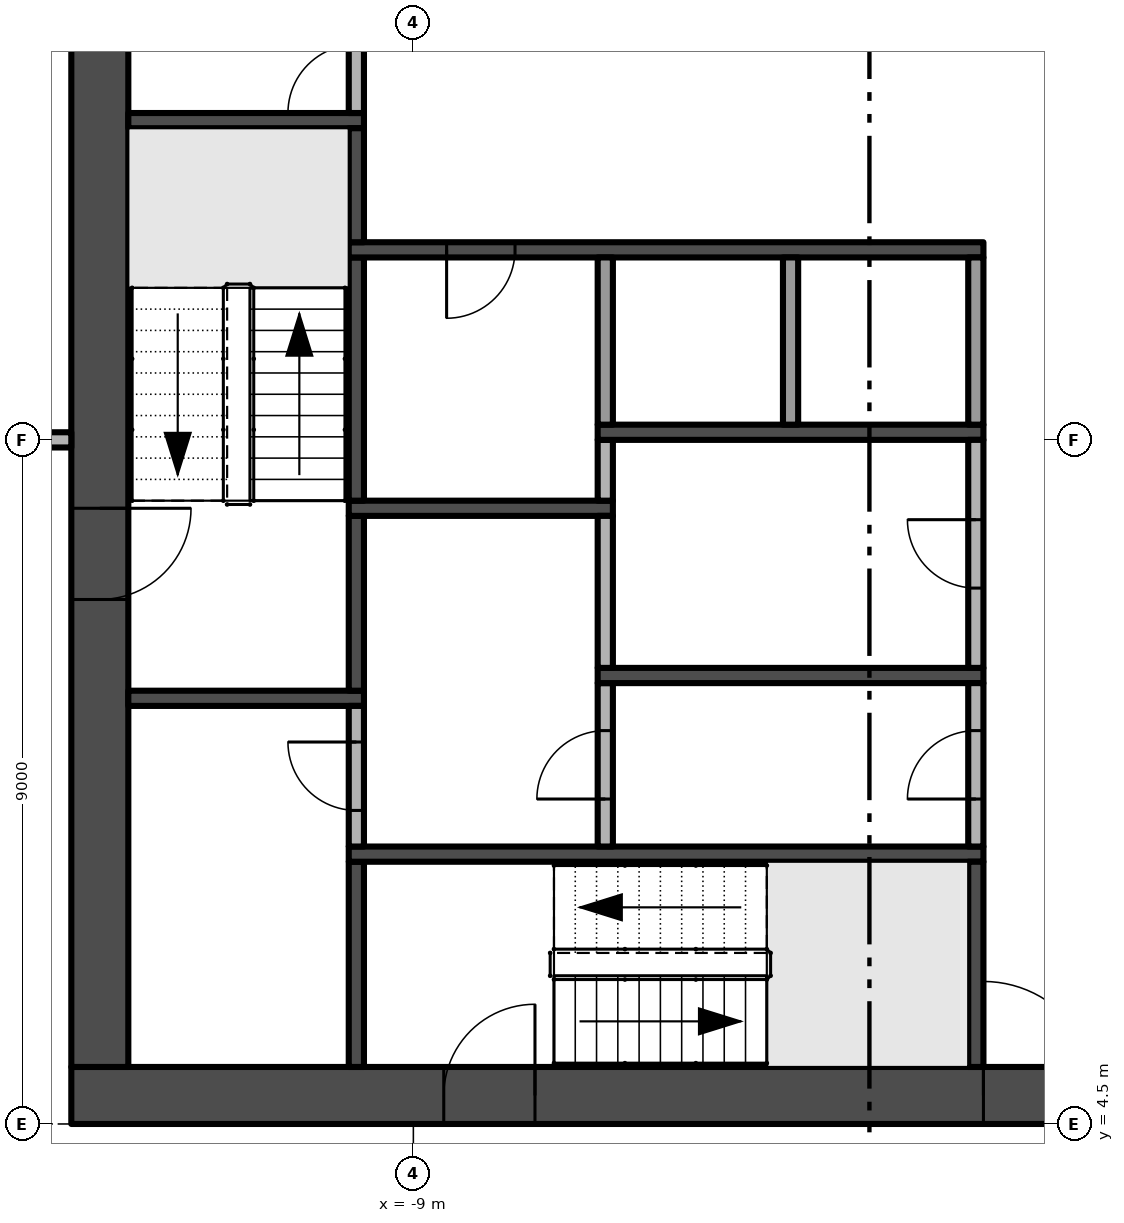
"""IFC4 building model, lengths in metres.
Left out: names, types, materials, properties, quantities, classifications, styles, units other than length and angle.
Written with IfcOpenShell. Run it as: python <this file> out.ifc"""

import sys

from ifc_helpers import new_model, si_unit, direction, frame, frame_2d, origin, place, context, subcontext, project, spatial, rectangle, extrude, element, fill, save


model = new_model("IFC4")
c1 = context("Model", 3, precision=1e-05, world=origin(), true_north=direction((0.0, 1.0)))
c2 = subcontext(c1, "Body", "Model", "MODEL_VIEW")
j1 = project(units=[si_unit("LENGTHUNIT", "METRE"), si_unit("PLANEANGLEUNIT", "RADIAN")], contexts=[c1])
p1 = place(None, origin())
s1 = spatial("IfcSite", under=j1, at=p1, CompositionType="ELEMENT")
p2 = place(p1, origin())
s2 = spatial("IfcBuilding", under=s1, at=p2, CompositionType="ELEMENT")
p3 = place(p2, frame((0.0, 0.0, 147.8)))
s3 = spatial("IfcBuildingStorey", under=s2, at=p3, CompositionType="ELEMENT", Elevation=147.8)
p4 = place(p3, frame((-13.5, 4.875, -0.3), z_axis=(0.0, 0.0, 1.0), x_axis=(1.0, 0.0, 0.0)))
e1 = element("IfcWall", 1, at=p4, inside=s3, PredefinedType="SHEAR", context=c2, shape_type="SweptSolid", body=[
    extrude(rectangle(XDim=27.0, YDim=0.75, at=frame_2d((13.5, 0.0))), origin(), (0.0, 0.0, 1.0), 3.8),
])
p5 = place(p4, frame((12.0, 0.0, 0.3)))
e2 = element("IfcOpeningElement", 2, at=p5, cuts=e1, PredefinedType="OPENING", context=c2, shape_type="SweptSolid", body=[
    extrude(rectangle(XDim=3.0, YDim=2.4, at=frame_2d((1.5, 1.2))), frame((0.0, 0.385, 0.0), z_axis=(0.0, -1.0, 0.0), x_axis=(1.0, 0.0, 0.0)), (0.0, 0.0, 1.0), 0.77),
])
p6 = place(p4, frame((4.9, 0.0, 0.3)))
e3 = element("IfcOpeningElement", 3, at=p6, cuts=e1, PredefinedType="OPENING", context=c2, shape_type="SweptSolid", body=[
    extrude(rectangle(XDim=1.2, YDim=2.2, at=frame_2d((0.6, 1.1))), frame((0.0, 0.385, 0.0), z_axis=(0.0, -1.0, 0.0), x_axis=(1.0, 0.0, 0.0)), (0.0, 0.0, 1.0), 0.77),
])
p7 = place(p4, frame((20.75, 0.0, 0.3)))
e4 = element("IfcOpeningElement", 4, at=p7, cuts=e1, PredefinedType="OPENING", context=c2, shape_type="SweptSolid", body=[
    extrude(rectangle(XDim=1.5, YDim=2.2, at=frame_2d((0.75, 1.1))), frame((0.0, 0.385, 0.0), z_axis=(0.0, -1.0, 0.0), x_axis=(1.0, 0.0, 0.0)), (0.0, 0.0, 1.0), 0.77),
])
p8 = place(p4, frame((17.4, 0.0, 0.3)))
e5 = element("IfcOpeningElement", 5, at=p8, cuts=e1, PredefinedType="OPENING", context=c2, shape_type="SweptSolid", body=[
    extrude(rectangle(XDim=1.2, YDim=2.2, at=frame_2d((0.6, 1.1))), frame((0.0, 0.385, 0.0), z_axis=(0.0, -1.0, 0.0), x_axis=(1.0, 0.0, 0.0)), (0.0, 0.0, 1.0), 0.77),
])
p9 = place(p3, frame((-13.125, 21.75, -0.3), z_axis=(0.0, 0.0, 1.0), x_axis=(0.0, -1.0, 0.0)))
e6 = element("IfcWall", 6, at=p9, inside=s3, PredefinedType="SHEAR", context=c2, shape_type="SweptSolid", body=[
    extrude(rectangle(XDim=16.5, YDim=0.75, at=frame_2d((8.25, 0.0))), origin(), (0.0, 0.0, 1.0), 3.8),
])
p10 = place(p9, frame((9.15, 0.0, 0.3)))
e7 = element("IfcOpeningElement", 7, at=p10, cuts=e6, PredefinedType="OPENING", context=c2, shape_type="SweptSolid", body=[
    extrude(rectangle(XDim=1.2, YDim=2.2, at=frame_2d((0.6, 1.1))), frame((0.0, 0.385, 0.0), z_axis=(0.0, -1.0, 0.0), x_axis=(1.0, 0.0, 0.0)), (0.0, 0.0, 1.0), 0.77),
])
for number, where, z_axis, x_axis in (
    (8, (-12.75, 10.1, 0.0), (0.0, 0.0, 1.0), (1.0, 0.0, 0.0)),
    (9, (-12.75, 17.7, 0.0), (0.0, 0.0, 1.0), (1.0, 0.0, 0.0)),
):
    element("IfcWall", number, at=place(p3, frame(where, z_axis=z_axis, x_axis=x_axis)), inside=s3, PredefinedType="SHEAR", context=c2, shape_type="SweptSolid", body=[
        extrude(rectangle(XDim=3.1, YDim=0.2, at=frame_2d((1.55, 0.0))), origin(), (0.0, 0.0, 1.0), 3.5),
    ])
p11 = place(p3, frame((-9.75, 5.25, 0.0), z_axis=(0.0, 0.0, 1.0), x_axis=(0.0, 1.0, 0.0)))
e10 = element("IfcWall", 10, at=p11, inside=s3, PredefinedType="SHEAR", context=c2, shape_type="SweptSolid", body=[
    extrude(rectangle(XDim=2.7, YDim=0.2, at=frame_2d((1.35, 0.0))), origin(), (0.0, 0.0, 1.0), 3.5),
])
p12 = place(p3, frame((-9.85, 8.05, 0.0), z_axis=(0.0, 0.0, 1.0), x_axis=(1.0, 0.0, 0.0)))
e11 = element("IfcWall", 11, at=p12, inside=s3, PredefinedType="SHEAR", context=c2, shape_type="SweptSolid", body=[
    extrude(rectangle(XDim=8.35, YDim=0.2, at=frame_2d((4.175, 0.0))), origin(), (0.0, 0.0, 1.0), 3.5),
])
p13 = place(p3, frame((-9.75, 8.15, 0.0), z_axis=(0.0, 0.0, 1.0), x_axis=(0.0, 1.0, 0.0)))
e12 = element("IfcWall", 12, at=p13, inside=s3, PredefinedType="PARTITIONING", context=c2, shape_type="SweptSolid", body=[
    extrude(rectangle(XDim=1.85, YDim=0.2, at=frame_2d((0.925, 0.0))), origin(), (0.0, 0.0, 1.0), 3.5),
])
p14 = place(p13, frame((0.475, 0.0, 0.0)))
e13 = element("IfcOpeningElement", 13, at=p14, cuts=e12, PredefinedType="OPENING", context=c2, shape_type="SweptSolid", body=[
    extrude(rectangle(XDim=0.9, YDim=2.1, at=frame_2d((0.45, 1.05))), frame((0.0, 0.11, 0.0), z_axis=(0.0, -1.0, 0.0), x_axis=(1.0, 0.0, 0.0)), (0.0, 0.0, 1.0), 0.22),
])
p15 = place(p3, frame((-9.75, 10.2, 0.0), z_axis=(0.0, 0.0, 1.0), x_axis=(0.0, 1.0, 0.0)))
e14 = element("IfcWall", 14, at=p15, inside=s3, PredefinedType="SHEAR", context=c2, shape_type="SweptSolid", body=[
    extrude(rectangle(XDim=2.3, YDim=0.2, at=frame_2d((1.15, 0.0))), origin(), (0.0, 0.0, 1.0), 3.5),
])
p16 = place(p3, frame((-9.85, 12.6, 0.0), z_axis=(0.0, 0.0, 1.0), x_axis=(1.0, 0.0, 0.0)))
e15 = element("IfcWall", 15, at=p16, inside=s3, PredefinedType="SHEAR", context=c2, shape_type="SweptSolid", body=[
    extrude(rectangle(XDim=3.475, YDim=0.2, at=frame_2d((1.738, 0.0))), origin(), (0.0, 0.0, 1.0), 3.5),
])
p17 = place(p3, frame((-9.75, 12.7, 0.0), z_axis=(0.0, 0.0, 1.0), x_axis=(0.0, 1.0, 0.0)))
e16 = element("IfcWall", 16, at=p17, inside=s3, PredefinedType="SHEAR", context=c2, shape_type="SweptSolid", body=[
    extrude(rectangle(XDim=3.2, YDim=0.2, at=frame_2d((1.6, 0.0))), origin(), (0.0, 0.0, 1.0), 3.5),
])
p18 = place(p3, frame((-1.5, 16.0, 0.0), z_axis=(0.0, 0.0, 1.0), x_axis=(-1.0, 0.0, 0.0)))
e17 = element("IfcWall", 17, at=p18, inside=s3, PredefinedType="SHEAR", context=c2, shape_type="SweptSolid", body=[
    extrude(rectangle(XDim=8.35, YDim=0.2, at=frame_2d((4.175, 0.0))), origin(), (0.0, 0.0, 1.0), 3.5),
])
p19 = place(p18, frame((6.162, 0.0, 0.0)))
e18 = element("IfcOpeningElement", 18, at=p19, cuts=e17, PredefinedType="OPENING", context=c2, shape_type="SweptSolid", body=[
    extrude(rectangle(XDim=0.9, YDim=2.1, at=frame_2d((0.45, 1.05))), frame((0.0, 0.11, 0.0), z_axis=(0.0, -1.0, 0.0), x_axis=(1.0, 0.0, 0.0)), (0.0, 0.0, 1.0), 0.22),
])
p20 = place(p3, frame((-9.75, 16.1, 0.0), z_axis=(0.0, 0.0, 1.0), x_axis=(0.0, 1.0, 0.0)))
e19 = element("IfcWall", 19, at=p20, inside=s3, PredefinedType="SHEAR", context=c2, shape_type="SweptSolid", body=[
    extrude(rectangle(XDim=1.5, YDim=0.2, at=frame_2d((0.75, 0.0))), origin(), (0.0, 0.0, 1.0), 3.5),
])
p21 = place(p3, frame((-9.75, 17.8, 0.0), z_axis=(0.0, 0.0, 1.0), x_axis=(0.0, 1.0, 0.0)))
e20 = element("IfcWall", 20, at=p21, inside=s3, PredefinedType="PARTITIONING", context=c2, shape_type="SweptSolid", body=[
    extrude(rectangle(XDim=1.4, YDim=0.2, at=frame_2d((0.7, 0.0))), origin(), (0.0, 0.0, 1.0), 3.5),
])
p22 = place(p21, origin())
e21 = element("IfcOpeningElement", 21, at=p22, cuts=e20, PredefinedType="OPENING", context=c2, shape_type="SweptSolid", body=[
    extrude(rectangle(XDim=0.9, YDim=2.1, at=frame_2d((0.45, 1.05))), frame((0.0, 0.11, 0.0), z_axis=(0.0, -1.0, 0.0), x_axis=(1.0, 0.0, 0.0)), (0.0, 0.0, 1.0), 0.22),
])
p23 = place(p3, frame((-6.475, 8.15, 0.0), z_axis=(0.0, 0.0, 1.0), x_axis=(0.0, 1.0, 0.0)))
e22 = element("IfcWall", 22, at=p23, inside=s3, PredefinedType="PARTITIONING", context=c2, shape_type="SweptSolid", body=[
    extrude(rectangle(XDim=2.15, YDim=0.2, at=frame_2d((1.075, 0.0))), origin(), (0.0, 0.0, 1.0), 3.5),
])
p24 = place(p23, frame((0.625, 0.0, 0.0)))
e23 = element("IfcOpeningElement", 23, at=p24, cuts=e22, PredefinedType="OPENING", context=c2, shape_type="SweptSolid", body=[
    extrude(rectangle(XDim=0.9, YDim=2.1, at=frame_2d((0.45, 1.05))), frame((0.0, 0.11, 0.0), z_axis=(0.0, -1.0, 0.0), x_axis=(1.0, 0.0, 0.0)), (0.0, 0.0, 1.0), 0.22),
])
p25 = place(p3, frame((-6.575, 10.4, 0.0), z_axis=(0.0, 0.0, 1.0), x_axis=(1.0, 0.0, 0.0)))
e24 = element("IfcWall", 24, at=p25, inside=s3, PredefinedType="SHEAR", context=c2, shape_type="SweptSolid", body=[
    extrude(rectangle(XDim=5.075, YDim=0.2, at=frame_2d((2.538, 0.0))), origin(), (0.0, 0.0, 1.0), 3.5),
])
p26 = place(p3, frame((-6.475, 10.5, 0.0), z_axis=(0.0, 0.0, 1.0), x_axis=(0.0, 1.0, 0.0)))
e25 = element("IfcWall", 25, at=p26, inside=s3, PredefinedType="PARTITIONING", context=c2, shape_type="SweptSolid", body=[
    extrude(rectangle(XDim=2.0, YDim=0.2, at=frame_2d((1.0, 0.0))), origin(), (0.0, 0.0, 1.0), 3.5),
])
p27 = place(p3, frame((-6.475, 12.7, 0.0), z_axis=(0.0, 0.0, 1.0), x_axis=(0.0, 1.0, 0.0)))
e26 = element("IfcWall", 26, at=p27, inside=s3, PredefinedType="PARTITIONING", context=c2, shape_type="SweptSolid", body=[
    extrude(rectangle(XDim=0.8, YDim=0.2, at=frame_2d((0.4, 0.0))), origin(), (0.0, 0.0, 1.0), 3.5),
])
p28 = place(p3, frame((-6.575, 13.6, 0.0), z_axis=(0.0, 0.0, 1.0), x_axis=(1.0, 0.0, 0.0)))
e27 = element("IfcWall", 27, at=p28, inside=s3, PredefinedType="SHEAR", context=c2, shape_type="SweptSolid", body=[
    extrude(rectangle(XDim=5.075, YDim=0.2, at=frame_2d((2.538, 0.0))), origin(), (0.0, 0.0, 1.0), 3.5),
])
for number, where, z_axis, x_axis in (
    (28, (-6.475, 13.7, 0.0), (0.0, 0.0, 1.0), (0.0, 1.0, 0.0)),
    (29, (-4.037, 13.7, 0.0), (0.0, 0.0, 1.0), (0.0, 1.0, 0.0)),
):
    element("IfcWall", number, at=place(p3, frame(where, z_axis=z_axis, x_axis=x_axis)), inside=s3, PredefinedType="PARTITIONING", context=c2, shape_type="SweptSolid", body=[
        extrude(rectangle(XDim=2.2, YDim=0.2, at=frame_2d((1.1, 0.0))), origin(), (0.0, 0.0, 1.0), 3.5),
    ])
p29 = place(p3, frame((-1.6, 5.25, 0.0), z_axis=(0.0, 0.0, 1.0), x_axis=(0.0, 1.0, 0.0)))
e30 = element("IfcWall", 30, at=p29, inside=s3, PredefinedType="SHEAR", context=c2, shape_type="SweptSolid", body=[
    extrude(rectangle(XDim=2.7, YDim=0.2, at=frame_2d((1.35, 0.0))), origin(), (0.0, 0.0, 1.0), 3.5),
])
p30 = place(p3, frame((-1.6, 8.15, 0.0), z_axis=(0.0, 0.0, 1.0), x_axis=(0.0, 1.0, 0.0)))
e31 = element("IfcWall", 31, at=p30, inside=s3, PredefinedType="PARTITIONING", context=c2, shape_type="SweptSolid", body=[
    extrude(rectangle(XDim=2.15, YDim=0.2, at=frame_2d((1.075, 0.0))), origin(), (0.0, 0.0, 1.0), 3.5),
])
p31 = place(p30, frame((0.625, 0.0, 0.0)))
e32 = element("IfcOpeningElement", 32, at=p31, cuts=e31, PredefinedType="OPENING", context=c2, shape_type="SweptSolid", body=[
    extrude(rectangle(XDim=0.9, YDim=2.1, at=frame_2d((0.45, 1.05))), frame((0.0, 0.11, 0.0), z_axis=(0.0, -1.0, 0.0), x_axis=(1.0, 0.0, 0.0)), (0.0, 0.0, 1.0), 0.22),
])
p32 = place(p3, frame((-1.6, 10.5, 0.0), z_axis=(0.0, 0.0, 1.0), x_axis=(0.0, 1.0, 0.0)))
e33 = element("IfcWall", 33, at=p32, inside=s3, PredefinedType="PARTITIONING", context=c2, shape_type="SweptSolid", body=[
    extrude(rectangle(XDim=3.0, YDim=0.2, at=frame_2d((1.5, 0.0))), origin(), (0.0, 0.0, 1.0), 3.5),
])
p33 = place(p32, frame((1.05, 0.0, 0.0)))
e34 = element("IfcOpeningElement", 34, at=p33, cuts=e33, PredefinedType="OPENING", context=c2, shape_type="SweptSolid", body=[
    extrude(rectangle(XDim=0.9, YDim=2.1, at=frame_2d((0.45, 1.05))), frame((0.0, 0.11, 0.0), z_axis=(0.0, -1.0, 0.0), x_axis=(1.0, 0.0, 0.0)), (0.0, 0.0, 1.0), 0.22),
])
p34 = place(p3, frame((-1.6, 13.7, 0.0), z_axis=(0.0, 0.0, 1.0), x_axis=(0.0, 1.0, 0.0)))
e35 = element("IfcWall", 35, at=p34, inside=s3, PredefinedType="PARTITIONING", context=c2, shape_type="SweptSolid", body=[
    extrude(rectangle(XDim=2.2, YDim=0.2, at=frame_2d((1.1, 0.0))), origin(), (0.0, 0.0, 1.0), 3.5),
])
p35 = place(p3, frame((-17.375, 13.5, 0.0), z_axis=(0.0, 0.0, 1.0), x_axis=(1.0, 0.0, 0.0)))
e36 = element("IfcWall", 36, at=p35, inside=s3, PredefinedType="PARTITIONING", context=c2, shape_type="SweptSolid", body=[
    extrude(rectangle(XDim=3.875, YDim=0.2, at=frame_2d((1.938, 0.0))), origin(), (0.0, 0.0, 1.0), 3.5),
])
p36 = place(p35, frame((1.35, 0.0, 0.0)))
e37 = element("IfcOpeningElement", 37, at=p36, cuts=e36, PredefinedType="OPENING", context=c2, shape_type="SweptSolid", body=[
    extrude(rectangle(XDim=0.9, YDim=2.1, at=frame_2d((0.45, 1.05))), frame((0.0, 0.11, 0.0), z_axis=(0.0, -1.0, 0.0), x_axis=(1.0, 0.0, 0.0)), (0.0, 0.0, 1.0), 0.22),
])
p37 = place(p5, frame((3.0, 0.0, 0.0), z_axis=(0.0, 0.0, 1.0), x_axis=(-1.0, 0.0, 0.0)))
e38 = element("IfcDoor", 38, at=p37, inside=s3, OperationType="DOUBLE_DOOR_SINGLE_SWING", PredefinedType="DOOR", context=c2, shape_type="SweptSolid", body=[
    extrude(rectangle(XDim=3.0, YDim=2.4, at=frame_2d((1.5, 1.2))), frame((0.0, 0.025, 0.0), z_axis=(0.0, -1.0, 0.0), x_axis=(1.0, 0.0, 0.0)), (0.0, 0.0, 1.0), 0.05),
])
fill(e2, e38)
p38 = place(p10, frame((1.2, 0.0, 0.0), z_axis=(0.0, 0.0, 1.0), x_axis=(-1.0, 0.0, 0.0)))
e39 = element("IfcDoor", 39, at=p38, inside=s3, OperationType="SINGLE_SWING_RIGHT", PredefinedType="DOOR", context=c2, shape_type="SweptSolid", body=[
    extrude(rectangle(XDim=1.2, YDim=2.2, at=frame_2d((0.6, 1.1))), frame((0.0, 0.025, 0.0), z_axis=(0.0, -1.0, 0.0), x_axis=(1.0, 0.0, 0.0)), (0.0, 0.0, 1.0), 0.05),
])
fill(e7, e39)
p39 = place(p6, frame((1.2, 0.0, 0.0), z_axis=(0.0, 0.0, 1.0), x_axis=(-1.0, 0.0, 0.0)))
e40 = element("IfcDoor", 40, at=p39, inside=s3, OperationType="SINGLE_SWING_LEFT", PredefinedType="DOOR", context=c2, shape_type="SweptSolid", body=[
    extrude(rectangle(XDim=1.2, YDim=2.2, at=frame_2d((0.6, 1.1))), frame((0.0, 0.025, 0.0), z_axis=(0.0, -1.0, 0.0), x_axis=(1.0, 0.0, 0.0)), (0.0, 0.0, 1.0), 0.05),
])
fill(e3, e40)
p40 = place(p19, origin())
e41 = element("IfcDoor", 41, at=p40, inside=s3, OperationType="SINGLE_SWING_RIGHT", PredefinedType="DOOR", context=c2, shape_type="SweptSolid", body=[
    extrude(rectangle(XDim=0.9, YDim=2.1, at=frame_2d((0.45, 1.05))), frame((0.0, 0.025, 0.0), z_axis=(0.0, -1.0, 0.0), x_axis=(1.0, 0.0, 0.0)), (0.0, 0.0, 1.0), 0.05),
])
fill(e18, e41)
p41 = place(p31, origin())
e42 = element("IfcDoor", 42, at=p41, inside=s3, OperationType="SINGLE_SWING_LEFT", PredefinedType="DOOR", context=c2, shape_type="SweptSolid", body=[
    extrude(rectangle(XDim=0.9, YDim=2.1, at=frame_2d((0.45, 1.05))), frame((0.0, 0.025, 0.0), z_axis=(0.0, -1.0, 0.0), x_axis=(1.0, 0.0, 0.0)), (0.0, 0.0, 1.0), 0.05),
])
fill(e32, e42)
p42 = place(p33, origin())
e43 = element("IfcDoor", 43, at=p42, inside=s3, OperationType="SINGLE_SWING_RIGHT", PredefinedType="DOOR", context=c2, shape_type="SweptSolid", body=[
    extrude(rectangle(XDim=0.9, YDim=2.1, at=frame_2d((0.45, 1.05))), frame((0.0, 0.025, 0.0), z_axis=(0.0, -1.0, 0.0), x_axis=(1.0, 0.0, 0.0)), (0.0, 0.0, 1.0), 0.05),
])
fill(e34, e43)
p43 = place(p22, origin())
e44 = element("IfcDoor", 44, at=p43, inside=s3, OperationType="SINGLE_SWING_LEFT", PredefinedType="DOOR", context=c2, shape_type="SweptSolid", body=[
    extrude(rectangle(XDim=0.9, YDim=2.1, at=frame_2d((0.45, 1.05))), frame((0.0, 0.025, 0.0), z_axis=(0.0, -1.0, 0.0), x_axis=(1.0, 0.0, 0.0)), (0.0, 0.0, 1.0), 0.05),
])
fill(e21, e44)
p44 = place(p24, origin())
e45 = element("IfcDoor", 45, at=p44, inside=s3, OperationType="SINGLE_SWING_LEFT", PredefinedType="DOOR", context=c2, shape_type="SweptSolid", body=[
    extrude(rectangle(XDim=0.9, YDim=2.1, at=frame_2d((0.45, 1.05))), frame((0.0, 0.025, 0.0), z_axis=(0.0, -1.0, 0.0), x_axis=(1.0, 0.0, 0.0)), (0.0, 0.0, 1.0), 0.05),
])
fill(e23, e45)
p45 = place(p14, origin())
e46 = element("IfcDoor", 46, at=p45, inside=s3, OperationType="SINGLE_SWING_RIGHT", PredefinedType="DOOR", context=c2, shape_type="SweptSolid", body=[
    extrude(rectangle(XDim=0.9, YDim=2.1, at=frame_2d((0.45, 1.05))), frame((0.0, 0.025, 0.0), z_axis=(0.0, -1.0, 0.0), x_axis=(1.0, 0.0, 0.0)), (0.0, 0.0, 1.0), 0.05),
])
fill(e13, e46)
save(model, sys.argv[1])
